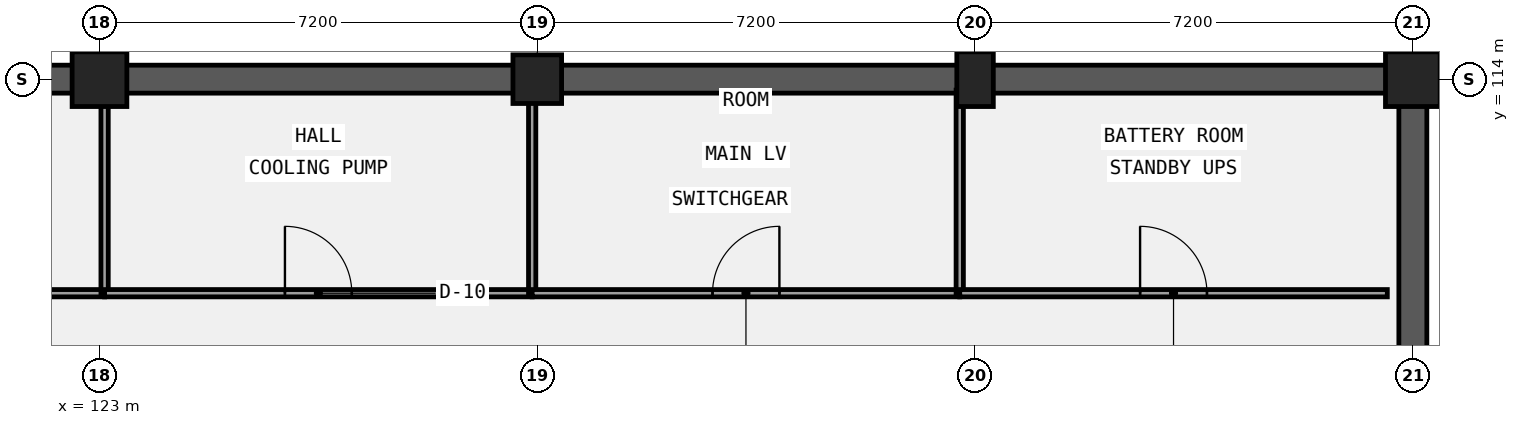
"""IFC4 building model, lengths in metres.
Left out: names, types, materials, properties, quantities, classifications, styles, units other than length and angle.
Written with IfcOpenShell. Run it as: python <this file> out.ifc"""

import sys

from ifc_helpers import new_model, si_unit, direction, frame, frame_2d, origin, origin_2d, place, context, subcontext, project, spatial, rectangle, extrude, element, fill, save


model = new_model("IFC4")
c1 = context("Model", 3, precision=1e-05, world=origin(), true_north=direction((0.0, 1.0)))
c2 = subcontext(c1, "Body", "Model", "MODEL_VIEW")
j1 = project(units=[si_unit("LENGTHUNIT", "METRE"), si_unit("PLANEANGLEUNIT", "RADIAN")], contexts=[c1])
p1 = place(None, origin())
s1 = spatial("IfcSite", under=j1, at=p1, CompositionType="ELEMENT")
p2 = place(p1, origin())
s2 = spatial("IfcBuilding", under=s1, at=p2, CompositionType="ELEMENT")
p3 = place(p2, frame((0.0, 0.0, -8.4)))
s3 = spatial("IfcBuildingStorey", under=s2, at=p3, CompositionType="ELEMENT", Elevation=-8.4)
p4 = place(p3, frame((108.37, 114.0, 0.0), z_axis=(0.0, 0.0, 1.0), x_axis=(1.0, 0.0, 0.0)))
e1 = element("IfcWall", 1, at=p4, inside=s3, PredefinedType="USERDEFINED", context=c2, shape_type="SweptSolid", body=[
    extrude(rectangle(XDim=36.46, YDim=0.46, at=frame_2d((18.23, 0.0))), origin(), (0.0, 0.0, 1.0), 3.15),
])
p5 = place(p3, frame((144.6, 113.78, 0.0), z_axis=(0.0, 0.0, 1.0), x_axis=(0.0, -1.0, 0.0)))
e2 = element("IfcWall", 2, at=p5, inside=s3, PredefinedType="USERDEFINED", context=c2, shape_type="SweptSolid", body=[
    extrude(rectangle(XDim=13.35, YDim=0.46, at=frame_2d((6.675, 0.0))), origin(), (0.0, 0.0, 1.0), 3.25),
])
p6 = place(p3, frame((123.0, 114.0, 0.0), z_axis=(0.0, 0.0, 1.0), x_axis=(1.0, 0.0, 0.0)))
e3 = element("IfcColumn", 3, at=p6, inside=s3, PredefinedType="COLUMN", context=c2, shape_type="SweptSolid", body=[
    extrude(rectangle(XDim=0.9, YDim=0.9, at=origin_2d()), origin(), (0.0, 0.0, 1.0), 4.2),
])
p7 = place(p3, frame((130.2, 114.0, 0.0), z_axis=(0.0, 0.0, 1.0), x_axis=(1.0, 0.0, 0.0)))
e4 = element("IfcColumn", 4, at=p7, inside=s3, PredefinedType="COLUMN", context=c2, shape_type="SweptSolid", body=[
    extrude(rectangle(XDim=0.8, YDim=0.8, at=origin_2d()), origin(), (0.0, 0.0, 1.0), 4.2),
])
p8 = place(p3, frame((137.4, 114.0, 0.0), z_axis=(0.0, 0.0, 1.0), x_axis=(1.0, 0.0, 0.0)))
e5 = element("IfcColumn", 5, at=p8, inside=s3, PredefinedType="COLUMN", context=c2, shape_type="SweptSolid", body=[
    extrude(rectangle(XDim=0.6, YDim=0.9, at=origin_2d()), origin(), (0.0, 0.0, 1.0), 4.2),
])
p9 = place(p3, frame((144.6, 114.0, 0.0), z_axis=(0.0, 0.0, 1.0), x_axis=(1.0, 0.0, 0.0)))
e6 = element("IfcColumn", 6, at=p9, inside=s3, PredefinedType="COLUMN", context=c2, shape_type="SweptSolid", body=[
    extrude(rectangle(XDim=0.9, YDim=0.9, at=origin_2d()), origin(), (0.0, 0.0, 1.0), 4.2),
])
p10 = place(p3, frame((116.052, 110.48, 0.0), z_axis=(0.0, 0.0, 1.0), x_axis=(1.0, 0.0, 0.0)))
e7 = element("IfcWall", 7, at=p10, inside=s3, PredefinedType="PARTITIONING", context=c2, shape_type="SweptSolid", body=[
    extrude(rectangle(XDim=7.032, YDim=0.12, at=frame_2d((3.516, 0.0))), origin(), (0.0, 0.0, 1.0), 3.35),
])
p11 = place(p10, frame((2.996, 0.0, 0.0)))
e8 = element("IfcOpeningElement", 8, at=p11, cuts=e7, PredefinedType="OPENING", context=c2, shape_type="SweptSolid", body=[
    extrude(rectangle(XDim=1.04, YDim=2.35, at=frame_2d((0.52, 1.175))), frame((0.0, 0.07, 0.0), z_axis=(0.0, -1.0, 0.0), x_axis=(1.0, 0.0, 0.0)), (0.0, 0.0, 1.0), 0.14),
])
p12 = place(p3, frame((123.084, 110.48, 0.0), z_axis=(0.0, 0.0, 1.0), x_axis=(0.0, 1.0, 0.0)))
e9 = element("IfcWall", 9, at=p12, inside=s3, PredefinedType="PARTITIONING", context=c2, shape_type="SweptSolid", body=[
    extrude(rectangle(XDim=3.34, YDim=0.12, at=frame_2d((1.67, 0.0))), origin(), (0.0, 0.0, 1.0), 2.9),
])
p13 = place(p3, frame((123.084, 110.48, 0.0), z_axis=(0.0, 0.0, 1.0), x_axis=(1.0, 0.0, 0.0)))
e10 = element("IfcWall", 10, at=p13, inside=s3, PredefinedType="PARTITIONING", context=c2, shape_type="SweptSolid", body=[
    extrude(rectangle(XDim=7.032, YDim=0.12, at=frame_2d((3.516, 0.0))), origin(), (0.0, 0.0, 1.0), 3.35),
])
p14 = place(p13, frame((2.966, 0.0, 0.0)))
e11 = element("IfcOpeningElement", 11, at=p14, cuts=e10, PredefinedType="OPENING", context=c2, shape_type="SweptSolid", body=[
    extrude(rectangle(XDim=1.1, YDim=2.1, at=frame_2d((0.55, 1.05))), frame((0.0, 0.07, 0.0), z_axis=(0.0, -1.0, 0.0), x_axis=(1.0, 0.0, 0.0)), (0.0, 0.0, 1.0), 0.14),
])
p15 = place(p3, frame((130.116, 110.48, 0.0), z_axis=(0.0, 0.0, 1.0), x_axis=(0.0, 1.0, 0.0)))
e12 = element("IfcWall", 12, at=p15, inside=s3, PredefinedType="PARTITIONING", context=c2, shape_type="SweptSolid", body=[
    extrude(rectangle(XDim=3.34, YDim=0.12, at=frame_2d((1.67, 0.0))), origin(), (0.0, 0.0, 1.0), 3.35),
])
p16 = place(p3, frame((130.116, 110.48, 0.0), z_axis=(0.0, 0.0, 1.0), x_axis=(1.0, 0.0, 0.0)))
e13 = element("IfcWall", 13, at=p16, inside=s3, PredefinedType="PARTITIONING", context=c2, shape_type="SweptSolid", body=[
    extrude(rectangle(XDim=7.032, YDim=0.12, at=frame_2d((3.516, 0.0))), origin(), (0.0, 0.0, 1.0), 3.35),
])
p17 = place(p16, frame((2.966, 0.0, 0.0)))
e14 = element("IfcOpeningElement", 14, at=p17, cuts=e13, PredefinedType="OPENING", context=c2, shape_type="SweptSolid", body=[
    extrude(rectangle(XDim=1.1, YDim=2.22, at=frame_2d((0.55, 1.11))), frame((0.0, 0.07, 0.0), z_axis=(0.0, -1.0, 0.0), x_axis=(1.0, 0.0, 0.0)), (0.0, 0.0, 1.0), 0.14),
])
p18 = place(p3, frame((137.148, 110.48, 0.0), z_axis=(0.0, 0.0, 1.0), x_axis=(0.0, 1.0, 0.0)))
e15 = element("IfcWall", 15, at=p18, inside=s3, PredefinedType="PARTITIONING", context=c2, shape_type="SweptSolid", body=[
    extrude(rectangle(XDim=3.34, YDim=0.12, at=frame_2d((1.67, 0.0))), origin(), (0.0, 0.0, 1.0), 3.3),
])
p19 = place(p3, frame((137.148, 110.48, 0.0), z_axis=(0.0, 0.0, 1.0), x_axis=(1.0, 0.0, 0.0)))
e16 = element("IfcWall", 16, at=p19, inside=s3, PredefinedType="PARTITIONING", context=c2, shape_type="SweptSolid", body=[
    extrude(rectangle(XDim=7.032, YDim=0.12, at=frame_2d((3.516, 0.0))), origin(), (0.0, 0.0, 1.0), 3.35),
])
p20 = place(p19, frame((2.966, 0.0, 0.0)))
e17 = element("IfcOpeningElement", 17, at=p20, cuts=e16, PredefinedType="OPENING", context=c2, shape_type="SweptSolid", body=[
    extrude(rectangle(XDim=1.1, YDim=2.35, at=frame_2d((0.55, 1.175))), frame((0.0, 0.07, 0.0), z_axis=(0.0, -1.0, 0.0), x_axis=(1.0, 0.0, 0.0)), (0.0, 0.0, 1.0), 0.14),
])
p21 = place(p14, origin())
e18 = element("IfcDoor", 18, at=p21, inside=s3, OperationType="SINGLE_SWING_LEFT", PredefinedType="DOOR", context=c2, shape_type="SweptSolid", body=[
    extrude(rectangle(XDim=1.1, YDim=2.1, at=frame_2d((0.55, 1.05))), frame((0.0, 0.025, 0.0), z_axis=(0.0, -1.0, 0.0), x_axis=(1.0, 0.0, 0.0)), (0.0, 0.0, 1.0), 0.05),
])
fill(e11, e18)
p22 = place(p17, origin())
e19 = element("IfcDoor", 19, at=p22, inside=s3, OperationType="SINGLE_SWING_RIGHT", PredefinedType="DOOR", context=c2, shape_type="SweptSolid", body=[
    extrude(rectangle(XDim=1.1, YDim=2.22, at=frame_2d((0.55, 1.11))), frame((0.0, 0.025, 0.0), z_axis=(0.0, -1.0, 0.0), x_axis=(1.0, 0.0, 0.0)), (0.0, 0.0, 1.0), 0.05),
])
fill(e14, e19)
p23 = place(p20, origin())
e20 = element("IfcDoor", 20, at=p23, inside=s3, OperationType="SINGLE_SWING_LEFT", PredefinedType="DOOR", context=c2, shape_type="SweptSolid", body=[
    extrude(rectangle(XDim=1.1, YDim=2.35, at=frame_2d((0.55, 1.175))), frame((0.0, 0.025, 0.0), z_axis=(0.0, -1.0, 0.0), x_axis=(1.0, 0.0, 0.0)), (0.0, 0.0, 1.0), 0.05),
])
fill(e17, e20)
save(model, sys.argv[1])
